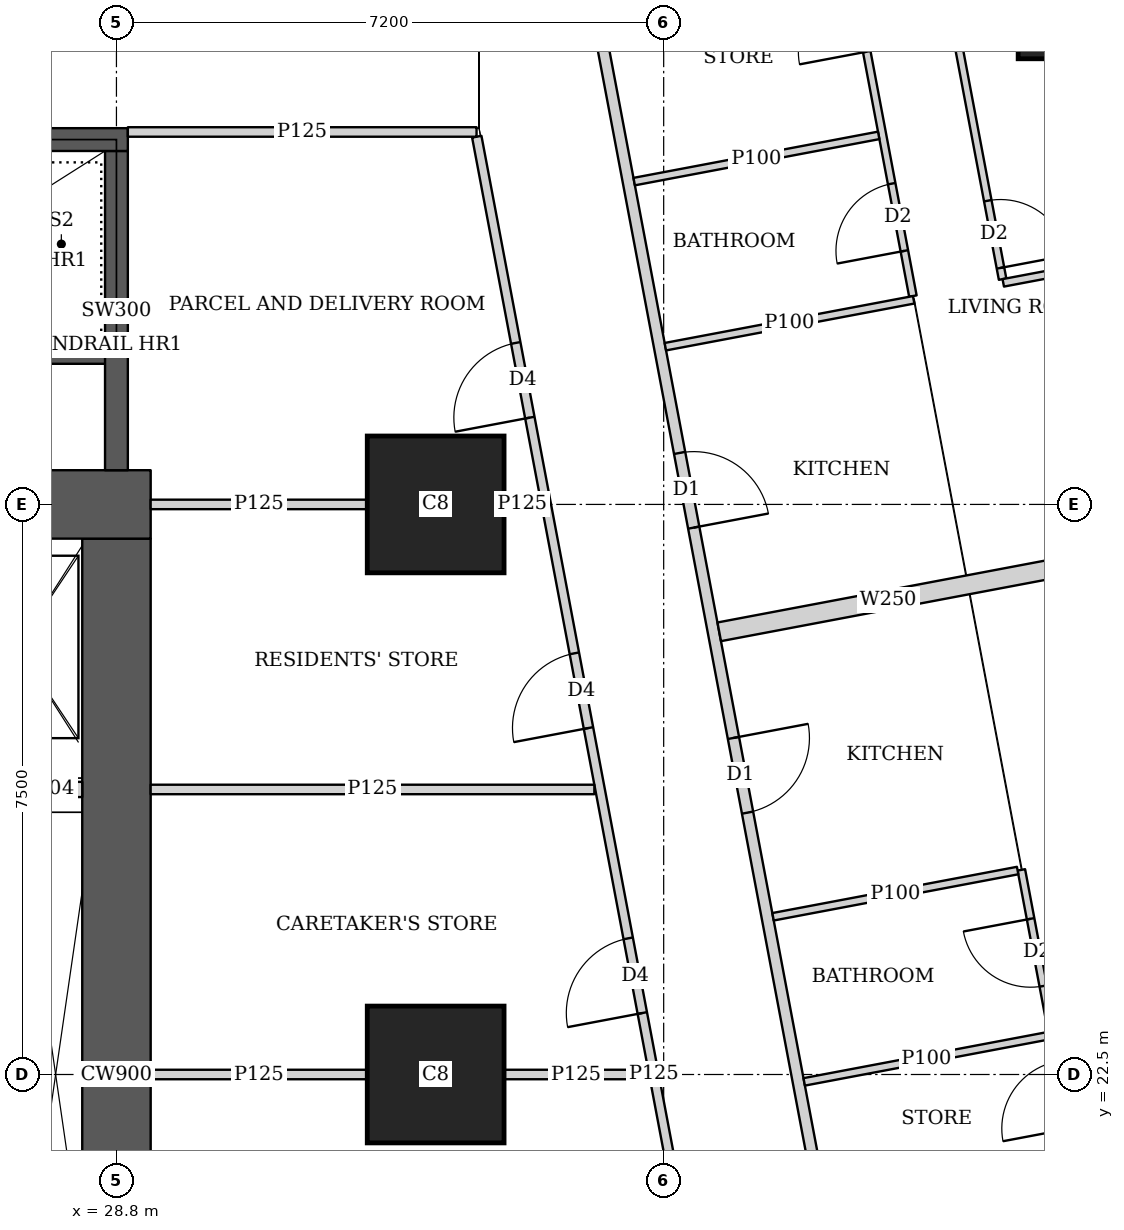
"""IFC4 building model, lengths in metres.
Left out: names, types, materials, properties, quantities, classifications, styles, units other than length and angle.
Written with IfcOpenShell. Run it as: python <this file> out.ifc"""

import sys

from ifc_helpers import new_model, si_unit, direction, frame, frame_2d, origin, origin_2d, place, context, subcontext, project, spatial, rectangle, extrude, element, fill, save


model = new_model("IFC4")
c1 = context("Model", 3, precision=1e-05, world=origin(), true_north=direction((0.0, 1.0)))
c2 = subcontext(c1, "Body", "Model", "MODEL_VIEW")
j1 = project(units=[si_unit("LENGTHUNIT", "METRE"), si_unit("PLANEANGLEUNIT", "RADIAN")], contexts=[c1])
p1 = place(None, origin())
s1 = spatial("IfcSite", under=j1, at=p1, CompositionType="ELEMENT")
p2 = place(p1, origin())
s2 = spatial("IfcBuilding", under=s1, at=p2, CompositionType="ELEMENT")
p3 = place(p2, frame((0.0, 0.0, 31.25)))
s3 = spatial("IfcBuildingStorey", under=s2, at=p3, CompositionType="ELEMENT", Elevation=31.25)
for number, where, z_axis, x_axis in (
    (1, (33.0, 22.5, 0.0), (0.0, 0.0, 1.0), (1.0, 0.0, 0.0)),
    (2, (33.0, 30.0, 0.0), (0.0, 0.0, 1.0), (1.0, 0.0, 0.0)),
):
    element("IfcColumn", number, at=place(p3, frame(where, z_axis=z_axis, x_axis=x_axis)), inside=s3, PredefinedType="COLUMN", context=c2, shape_type="SweptSolid", body=[
        extrude(rectangle(XDim=1.8, YDim=1.8, at=origin_2d()), origin(), (0.0, 0.0, 1.0), 3.75),
    ])
p4 = place(p3, frame((42.064, 37.263, 0.0), z_axis=(0.0, 0.0, 1.0), x_axis=(1.0, 0.0, 0.0)))
e3 = element("IfcColumn", 3, at=p4, inside=s3, PredefinedType="COLUMN", context=c2, shape_type="SweptSolid", body=[
    extrude(rectangle(XDim=2.8, YDim=2.8, at=origin_2d()), origin(), (0.0, 0.0, 1.0), 3.75),
])
p5 = place(p3, frame((13.95, 30.0, 0.0), z_axis=(0.0, 0.0, 1.0), x_axis=(1.0, 0.0, 0.0)))
e4 = element("IfcWall", 4, at=p5, inside=s3, PredefinedType="SHEAR", context=c2, shape_type="SweptSolid", body=[
    extrude(rectangle(XDim=15.3, YDim=0.9, at=frame_2d((7.65, 0.0))), origin(), (0.0, 0.0, 1.0), 3.75),
])
p6 = place(p5, frame((4.45, 0.0, 0.0)))
e5 = element("IfcOpeningElement", 5, at=p6, cuts=e4, PredefinedType="OPENING", context=c2, shape_type="SweptSolid", body=[
    extrude(rectangle(XDim=1.8, YDim=2.1, at=frame_2d((0.9, 1.05))), frame((0.0, 0.46, 0.0), z_axis=(0.0, -1.0, 0.0), x_axis=(1.0, 0.0, 0.0)), (0.0, 0.0, 1.0), 0.92),
])
p7 = place(p5, frame((10.7, 0.0, 0.0)))
e6 = element("IfcOpeningElement", 6, at=p7, cuts=e4, PredefinedType="OPENING", context=c2, shape_type="SweptSolid", body=[
    extrude(rectangle(XDim=1.1, YDim=2.1, at=frame_2d((0.55, 1.05))), frame((0.0, 0.46, 0.0), z_axis=(0.0, -1.0, 0.0), x_axis=(1.0, 0.0, 0.0)), (0.0, 0.0, 1.0), 0.92),
])
p8 = place(p3, frame((28.8, 15.45, 0.0), z_axis=(0.0, 0.0, 1.0), x_axis=(0.0, 1.0, 0.0)))
e7 = element("IfcWall", 7, at=p8, inside=s3, PredefinedType="SHEAR", context=c2, shape_type="SweptSolid", body=[
    extrude(rectangle(XDim=14.1, YDim=0.9, at=frame_2d((7.05, 0.0))), origin(), (0.0, 0.0, 1.0), 3.75),
])
p9 = place(p3, frame((21.45, 34.8, 0.0), z_axis=(0.0, 0.0, 1.0), x_axis=(1.0, 0.0, 0.0)))
e8 = element("IfcWall", 8, at=p9, inside=s3, PredefinedType="SHEAR", context=c2, shape_type="SweptSolid", body=[
    extrude(rectangle(XDim=7.5, YDim=0.3, at=frame_2d((3.75, 0.0))), origin(), (0.0, 0.0, 1.0), 3.75),
])
p10 = place(p9, frame((0.5, 0.0, 0.0)))
e9 = element("IfcOpeningElement", 9, at=p10, cuts=e8, PredefinedType="OPENING", context=c2, shape_type="SweptSolid", body=[
    extrude(rectangle(XDim=1.1, YDim=2.1, at=frame_2d((0.55, 1.05))), frame((0.0, 0.16, 0.0), z_axis=(0.0, -1.0, 0.0), x_axis=(1.0, 0.0, 0.0)), (0.0, 0.0, 1.0), 0.32),
])
p11 = place(p3, frame((28.8, 30.45, 0.0), z_axis=(0.0, 0.0, 1.0), x_axis=(0.0, 1.0, 0.0)))
e10 = element("IfcWall", 10, at=p11, inside=s3, PredefinedType="SHEAR", context=c2, shape_type="SweptSolid", body=[
    extrude(rectangle(XDim=4.2, YDim=0.3, at=frame_2d((2.1, 0.0))), origin(), (0.0, 0.0, 1.0), 3.75),
])
p12 = place(p3, frame((35.094, 36.585, 0.0), z_axis=(0.0, 0.0, 1.0), x_axis=(0.185588860311, -0.982627485331, 0.0)))
e11 = element("IfcWall", 11, at=p12, inside=s3, PredefinedType="SOLIDWALL", context=c2, shape_type="SweptSolid", body=[
    extrude(rectangle(XDim=34.797, YDim=0.15, at=frame_2d((17.399, 0.0))), origin(), (0.0, 0.0, 1.0), 2.5),
])
p13 = place(p12, frame((6.012, 0.0, 0.0)))
e12 = element("IfcOpeningElement", 12, at=p13, cuts=e11, PredefinedType="OPENING", context=c2, shape_type="SweptSolid", body=[
    extrude(rectangle(XDim=1.0, YDim=2.1, at=frame_2d((0.5, 1.05))), frame((0.0, 0.085, 0.0), z_axis=(0.0, -1.0, 0.0), x_axis=(1.0, 0.0, 0.0)), (0.0, 0.0, 1.0), 0.17),
])
p14 = place(p12, frame((9.828, 0.0, 0.0)))
e13 = element("IfcOpeningElement", 13, at=p14, cuts=e11, PredefinedType="OPENING", context=c2, shape_type="SweptSolid", body=[
    extrude(rectangle(XDim=1.0, YDim=2.1, at=frame_2d((0.5, 1.05))), frame((0.0, 0.085, 0.0), z_axis=(0.0, -1.0, 0.0), x_axis=(1.0, 0.0, 0.0)), (0.0, 0.0, 1.0), 0.17),
])
p15 = place(p12, frame((25.9, 0.0, 0.0)))
e14 = element("IfcOpeningElement", 14, at=p15, cuts=e11, PredefinedType="OPENING", context=c2, shape_type="SweptSolid", body=[
    extrude(rectangle(XDim=1.0, YDim=2.1, at=frame_2d((0.5, 1.05))), frame((0.0, 0.085, 0.0), z_axis=(0.0, -1.0, 0.0), x_axis=(1.0, 0.0, 0.0)), (0.0, 0.0, 1.0), 0.17),
])
p16 = place(p3, frame((38.9, 41.22, 0.0), z_axis=(0.0, 0.0, 1.0), x_axis=(0.18556562412, -0.982631873666, 0.0)))
e15 = element("IfcWall", 15, at=p16, inside=s3, PredefinedType="PARTITIONING", context=c2, shape_type="SweptSolid", body=[
    extrude(rectangle(XDim=8.402, YDim=0.1, at=frame_2d((4.201, 0.0))), origin(), (0.0, 0.0, 1.0), 3.5),
])
p17 = place(p16, frame((7.352, 0.0, 0.0)))
e16 = element("IfcOpeningElement", 16, at=p17, cuts=e15, PredefinedType="OPENING", context=c2, shape_type="SweptSolid", body=[
    extrude(rectangle(XDim=0.9, YDim=2.1, at=frame_2d((0.45, 1.05))), frame((0.0, 0.06, 0.0), z_axis=(0.0, -1.0, 0.0), x_axis=(1.0, 0.0, 0.0)), (0.0, 0.0, 1.0), 0.12),
])
p18 = place(p16, frame((1.9, 0.0, 0.0)))
e17 = element("IfcOpeningElement", 17, at=p18, cuts=e15, PredefinedType="OPENING", context=c2, shape_type="SweptSolid", body=[
    extrude(rectangle(XDim=0.9, YDim=2.1, at=frame_2d((0.45, 1.05))), frame((0.0, 0.06, 0.0), z_axis=(0.0, -1.0, 0.0), x_axis=(1.0, 0.0, 0.0)), (0.0, 0.0, 1.0), 0.12),
])
p19 = place(p3, frame((37.514, 42.089, 0.0), z_axis=(0.0, 0.0, 1.0), x_axis=(0.185543450498, -0.982636060796, 0.0)))
e18 = element("IfcWall", 18, at=p19, inside=s3, PredefinedType="PARTITIONING", context=c2, shape_type="SweptSolid", body=[
    extrude(rectangle(XDim=9.513, YDim=0.1, at=frame_2d((4.757, 0.0))), origin(), (0.0, 0.0, 1.0), 3.5),
])
p20 = place(p19, frame((8.008, 0.0, 0.0)))
e19 = element("IfcOpeningElement", 19, at=p20, cuts=e18, PredefinedType="OPENING", context=c2, shape_type="SweptSolid", body=[
    extrude(rectangle(XDim=0.9, YDim=2.1, at=frame_2d((0.45, 1.05))), frame((0.0, 0.06, 0.0), z_axis=(0.0, -1.0, 0.0), x_axis=(1.0, 0.0, 0.0)), (0.0, 0.0, 1.0), 0.12),
])
p21 = place(p19, frame((2.63, 0.0, 0.0)))
e20 = element("IfcOpeningElement", 20, at=p21, cuts=e18, PredefinedType="OPENING", context=c2, shape_type="SweptSolid", body=[
    extrude(rectangle(XDim=0.9, YDim=2.1, at=frame_2d((0.45, 1.05))), frame((0.0, 0.06, 0.0), z_axis=(0.0, -1.0, 0.0), x_axis=(1.0, 0.0, 0.0)), (0.0, 0.0, 1.0), 0.12),
])
p22 = place(p19, frame((5.341, 0.0, 0.0)))
e21 = element("IfcOpeningElement", 21, at=p22, cuts=e18, PredefinedType="OPENING", context=c2, shape_type="SweptSolid", body=[
    extrude(rectangle(XDim=0.9, YDim=2.1, at=frame_2d((0.45, 1.05))), frame((0.0, 0.06, 0.0), z_axis=(0.0, -1.0, 0.0), x_axis=(1.0, 0.0, 0.0)), (0.0, 0.0, 1.0), 0.12),
])
p23 = place(p3, frame((44.693, 33.713, 0.0), z_axis=(0.0, 0.0, 1.0), x_axis=(-0.982633535512, -0.185556823879, 0.0)))
e22 = element("IfcWall", 22, at=p23, inside=s3, PredefinedType="PARTITIONING", context=c2, shape_type="SweptSolid", body=[
    extrude(rectangle(XDim=4.3, YDim=0.1, at=frame_2d((2.15, 0.0))), origin(), (0.0, 0.0, 1.0), 2.05),
])
p24 = place(p3, frame((39.289, 32.692, 0.0), z_axis=(0.0, 0.0, 1.0), x_axis=(-0.982633623707, -0.185556356831, 0.0)))
e23 = element("IfcWall", 23, at=p24, inside=s3, PredefinedType="PARTITIONING", context=c2, shape_type="SweptSolid", body=[
    extrude(rectangle(XDim=3.325, YDim=0.1, at=frame_2d((1.663, 0.0))), origin(), (0.0, 0.0, 1.0), 3.5),
])
p25 = place(p3, frame((38.829, 34.855, 0.0), z_axis=(0.0, 0.0, 1.0), x_axis=(-0.982610347627, -0.185679575441, 0.0)))
e24 = element("IfcWall", 24, at=p25, inside=s3, PredefinedType="PARTITIONING", context=c2, shape_type="SweptSolid", body=[
    extrude(rectangle(XDim=3.274, YDim=0.1, at=frame_2d((1.637, 0.0))), origin(), (0.0, 0.0, 1.0), 3.5),
])
p26 = place(p3, frame((40.706, 25.192, 0.0), z_axis=(0.0, 0.0, 1.0), x_axis=(0.185572668944, -0.982630543257, 0.0)))
e25 = element("IfcWall", 25, at=p26, inside=s3, PredefinedType="PARTITIONING", context=c2, shape_type="SweptSolid", body=[
    extrude(rectangle(XDim=9.446, YDim=0.1, at=frame_2d((4.723, 0.0))), origin(), (0.0, 0.0, 1.0), 2.5),
])
p27 = place(p26, frame((0.655, 0.0, 0.0)))
e26 = element("IfcOpeningElement", 26, at=p27, cuts=e25, PredefinedType="OPENING", context=c2, shape_type="SweptSolid", body=[
    extrude(rectangle(XDim=0.9, YDim=2.1, at=frame_2d((0.45, 1.05))), frame((0.0, 0.06, 0.0), z_axis=(0.0, -1.0, 0.0), x_axis=(1.0, 0.0, 0.0)), (0.0, 0.0, 1.0), 0.12),
])
p28 = place(p26, frame((4.166, 0.0, 0.0)))
e27 = element("IfcOpeningElement", 27, at=p28, cuts=e25, PredefinedType="OPENING", context=c2, shape_type="SweptSolid", body=[
    extrude(rectangle(XDim=0.9, YDim=2.1, at=frame_2d((0.45, 1.05))), frame((0.0, 0.06, 0.0), z_axis=(0.0, -1.0, 0.0), x_axis=(1.0, 0.0, 0.0)), (0.0, 0.0, 1.0), 0.12),
])
p29 = place(p26, frame((8.396, 0.0, 0.0)))
e28 = element("IfcOpeningElement", 28, at=p29, cuts=e25, PredefinedType="OPENING", context=c2, shape_type="SweptSolid", body=[
    extrude(rectangle(XDim=0.9, YDim=2.1, at=frame_2d((0.45, 1.05))), frame((0.0, 0.06, 0.0), z_axis=(0.0, -1.0, 0.0), x_axis=(1.0, 0.0, 0.0)), (0.0, 0.0, 1.0), 0.12),
])
p30 = place(p26, frame((2.563, 0.0, 0.0)))
e29 = element("IfcOpeningElement", 29, at=p30, cuts=e25, PredefinedType="OPENING", context=c2, shape_type="SweptSolid", body=[
    extrude(rectangle(XDim=0.9, YDim=2.1, at=frame_2d((0.45, 1.05))), frame((0.0, 0.06, 0.0), z_axis=(0.0, -1.0, 0.0), x_axis=(1.0, 0.0, 0.0)), (0.0, 0.0, 1.0), 0.12),
])
p31 = place(p26, frame((6.074, 0.0, 0.0)))
e30 = element("IfcOpeningElement", 30, at=p31, cuts=e25, PredefinedType="OPENING", context=c2, shape_type="SweptSolid", body=[
    extrude(rectangle(XDim=0.9, YDim=2.1, at=frame_2d((0.45, 1.05))), frame((0.0, 0.06, 0.0), z_axis=(0.0, -1.0, 0.0), x_axis=(1.0, 0.0, 0.0)), (0.0, 0.0, 1.0), 0.12),
])
p32 = place(p3, frame((40.657, 25.183, 0.0), z_axis=(0.0, 0.0, 1.0), x_axis=(-0.982607026909, -0.185697147715, 0.0)))
e31 = element("IfcWall", 31, at=p32, inside=s3, PredefinedType="PARTITIONING", context=c2, shape_type="SweptSolid", body=[
    extrude(rectangle(XDim=3.275, YDim=0.1, at=frame_2d((1.637, 0.0))), origin(), (0.0, 0.0, 1.0), 3.5),
])
p33 = place(p3, frame((41.067, 23.011, 0.0), z_axis=(0.0, 0.0, 1.0), x_axis=(-0.982618057925, -0.185638768151, 0.0)))
e32 = element("IfcWall", 32, at=p33, inside=s3, PredefinedType="PARTITIONING", context=c2, shape_type="SweptSolid", body=[
    extrude(rectangle(XDim=3.275, YDim=0.1, at=frame_2d((1.637, 0.0))), origin(), (0.0, 0.0, 1.0), 2.5),
])
p34 = place(p3, frame((41.177, 29.164, 0.0), z_axis=(0.0, 0.0, 1.0), x_axis=(-0.982612837616, -0.185666398014, 0.0)))
e33 = element("IfcWall", 33, at=p34, inside=s3, PredefinedType="SOLIDWALL", context=c2, shape_type="SweptSolid", body=[
    extrude(rectangle(XDim=4.525, YDim=0.25, at=frame_2d((2.262, 0.0))), origin(), (0.0, 0.0, 1.0), 2.5),
])
p35 = place(p3, frame((28.95, 34.9, 0.0), z_axis=(0.0, 0.0, 1.0), x_axis=(1.0, 0.0, 0.0)))
e34 = element("IfcWall", 34, at=p35, inside=s3, PredefinedType="PARTITIONING", context=c2, shape_type="SweptSolid", body=[
    extrude(rectangle(XDim=4.588, YDim=0.125, at=frame_2d((2.294, 0.0))), origin(), (0.0, 0.0, 1.0), 3.5),
])
p36 = place(p3, frame((38.202, 10.163, 0.0), z_axis=(0.0, 0.0, 1.0), x_axis=(-0.185610321132, 0.982623431783, 0.0)))
e35 = element("IfcWall", 35, at=p36, inside=s3, PredefinedType="PARTITIONING", context=c2, shape_type="SweptSolid", body=[
    extrude(rectangle(XDim=25.111, YDim=0.125, at=frame_2d((12.556, 0.0))), origin(), (0.0, 0.0, 1.0), 2.5),
])
p37 = place(p36, frame((0.708, 0.0, 0.0)))
e36 = element("IfcOpeningElement", 36, at=p37, cuts=e35, PredefinedType="OPENING", context=c2, shape_type="SweptSolid", body=[
    extrude(rectangle(XDim=1.0, YDim=2.1, at=frame_2d((0.5, 1.05))), frame((0.0, 0.073, 0.0), z_axis=(0.0, -1.0, 0.0), x_axis=(1.0, 0.0, 0.0)), (0.0, 0.0, 1.0), 0.145),
])
p38 = place(p36, frame((6.1, 0.0, 0.0)))
e37 = element("IfcOpeningElement", 37, at=p38, cuts=e35, PredefinedType="OPENING", context=c2, shape_type="SweptSolid", body=[
    extrude(rectangle(XDim=1.0, YDim=2.1, at=frame_2d((0.5, 1.05))), frame((0.0, 0.073, 0.0), z_axis=(0.0, -1.0, 0.0), x_axis=(1.0, 0.0, 0.0)), (0.0, 0.0, 1.0), 0.145),
])
p39 = place(p36, frame((13.378, 0.0, 0.0)))
e38 = element("IfcOpeningElement", 38, at=p39, cuts=e35, PredefinedType="OPENING", context=c2, shape_type="SweptSolid", body=[
    extrude(rectangle(XDim=1.0, YDim=2.1, at=frame_2d((0.5, 1.05))), frame((0.0, 0.073, 0.0), z_axis=(0.0, -1.0, 0.0), x_axis=(1.0, 0.0, 0.0)), (0.0, 0.0, 1.0), 0.145),
])
p40 = place(p36, frame((17.194, 0.0, 0.0)))
e39 = element("IfcOpeningElement", 39, at=p40, cuts=e35, PredefinedType="OPENING", context=c2, shape_type="SweptSolid", body=[
    extrude(rectangle(XDim=1.0, YDim=2.1, at=frame_2d((0.5, 1.05))), frame((0.0, 0.073, 0.0), z_axis=(0.0, -1.0, 0.0), x_axis=(1.0, 0.0, 0.0)), (0.0, 0.0, 1.0), 0.145),
])
p41 = place(p36, frame((21.35, 0.0, 0.0)))
e40 = element("IfcOpeningElement", 40, at=p41, cuts=e35, PredefinedType="OPENING", context=c2, shape_type="SweptSolid", body=[
    extrude(rectangle(XDim=1.0, YDim=2.1, at=frame_2d((0.5, 1.05))), frame((0.0, 0.073, 0.0), z_axis=(0.0, -1.0, 0.0), x_axis=(1.0, 0.0, 0.0)), (0.0, 0.0, 1.0), 0.145),
])
p42 = place(p3, frame((29.25, 22.5, 0.0), z_axis=(0.0, 0.0, 1.0), x_axis=(1.0, 0.0, 0.0)))
e41 = element("IfcWall", 41, at=p42, inside=s3, PredefinedType="PARTITIONING", context=c2, shape_type="SweptSolid", body=[
    extrude(rectangle(XDim=2.849, YDim=0.125, at=frame_2d((1.425, 0.0))), origin(), (0.0, 0.0, 1.0), 3.5),
])
p43 = place(p3, frame((33.901, 22.5, 0.0), z_axis=(0.0, 0.0, 1.0), x_axis=(1.0, 0.0, 0.0)))
e42 = element("IfcWall", 42, at=p43, inside=s3, PredefinedType="PARTITIONING", context=c2, shape_type="SweptSolid", body=[
    extrude(rectangle(XDim=1.895, YDim=0.125, at=frame_2d((0.948, 0.0))), origin(), (0.0, 0.0, 1.0), 2.5),
])
p44 = place(p3, frame((29.25, 26.25, 0.0), z_axis=(0.0, 0.0, 1.0), x_axis=(1.0, 0.0, 0.0)))
e43 = element("IfcWall", 43, at=p44, inside=s3, PredefinedType="PARTITIONING", context=c2, shape_type="SweptSolid", body=[
    extrude(rectangle(XDim=5.838, YDim=0.125, at=frame_2d((2.919, 0.0))), origin(), (0.0, 0.0, 1.0), 3.5),
])
p45 = place(p3, frame((29.25, 30.0, 0.0), z_axis=(0.0, 0.0, 1.0), x_axis=(1.0, 0.0, 0.0)))
e44 = element("IfcWall", 44, at=p45, inside=s3, PredefinedType="PARTITIONING", context=c2, shape_type="SweptSolid", body=[
    extrude(rectangle(XDim=2.849, YDim=0.125, at=frame_2d((1.425, 0.0))), origin(), (0.0, 0.0, 1.0), 3.5),
])
p46 = place(p3, frame((33.901, 30.0, 0.0), z_axis=(0.0, 0.0, 1.0), x_axis=(1.0, 0.0, 0.0)))
e45 = element("IfcWall", 45, at=p46, inside=s3, PredefinedType="PARTITIONING", context=c2, shape_type="SweptSolid", body=[
    extrude(rectangle(XDim=0.478, YDim=0.125, at=frame_2d((0.239, 0.0))), origin(), (0.0, 0.0, 1.0), 2.5),
])
p47 = place(p3, frame((23.0, 31.95, 0.0), z_axis=(0.0, 0.0, 1.0), x_axis=(1.0, 0.0, 0.0)))
e46 = element("IfcWall", 46, at=p47, inside=s3, PredefinedType="SHEAR", context=c2, shape_type="SweptSolid", body=[
    extrude(rectangle(XDim=5.8, YDim=0.2, at=frame_2d((2.9, 0.0))), origin(), (0.0, 0.0, 1.0), 3.75),
])
p48 = place(p3, frame((27.4, 26.25, 0.0), z_axis=(0.0, 0.0, 1.0), x_axis=(1.0, 0.0, 0.0)))
e47 = element("IfcWall", 47, at=p48, inside=s3, PredefinedType="SOLIDWALL", context=c2, shape_type="SweptSolid", body=[
    extrude(rectangle(XDim=0.95, YDim=0.2, at=frame_2d((0.475, 0.0))), origin(), (0.0, 0.0, 1.0), 3.5),
])
p49 = place(p17, origin())
e48 = element("IfcDoor", 48, at=p49, inside=s3, OperationType="SINGLE_SWING_RIGHT", PredefinedType="DOOR", context=c2, shape_type="SweptSolid", body=[
    extrude(rectangle(XDim=0.9, YDim=2.1, at=frame_2d((0.45, 1.05))), frame((0.0, 0.025, 0.0), z_axis=(0.0, -1.0, 0.0), x_axis=(1.0, 0.0, 0.0)), (0.0, 0.0, 1.0), 0.05),
])
fill(e16, e48)
p50 = place(p20, origin())
e49 = element("IfcDoor", 49, at=p50, inside=s3, OperationType="SINGLE_SWING_LEFT", PredefinedType="DOOR", context=c2, shape_type="SweptSolid", body=[
    extrude(rectangle(XDim=0.9, YDim=2.1, at=frame_2d((0.45, 1.05))), frame((0.0, 0.025, 0.0), z_axis=(0.0, -1.0, 0.0), x_axis=(1.0, 0.0, 0.0)), (0.0, 0.0, 1.0), 0.05),
])
fill(e19, e49)
p51 = place(p13, origin())
e50 = element("IfcDoor", 50, at=p51, inside=s3, OperationType="SINGLE_SWING_RIGHT", PredefinedType="DOOR", context=c2, shape_type="SweptSolid", body=[
    extrude(rectangle(XDim=1.0, YDim=2.1, at=frame_2d((0.5, 1.05))), frame((0.0, 0.025, 0.0), z_axis=(0.0, -1.0, 0.0), x_axis=(1.0, 0.0, 0.0)), (0.0, 0.0, 1.0), 0.05),
])
fill(e12, e50)
p52 = place(p27, origin())
e51 = element("IfcDoor", 51, at=p52, inside=s3, OperationType="SINGLE_SWING_RIGHT", PredefinedType="DOOR", context=c2, shape_type="SweptSolid", body=[
    extrude(rectangle(XDim=0.9, YDim=2.1, at=frame_2d((0.45, 1.05))), frame((0.0, 0.025, 0.0), z_axis=(0.0, -1.0, 0.0), x_axis=(1.0, 0.0, 0.0)), (0.0, 0.0, 1.0), 0.05),
])
fill(e26, e51)
p53 = place(p14, origin())
e52 = element("IfcDoor", 52, at=p53, inside=s3, OperationType="SINGLE_SWING_LEFT", PredefinedType="DOOR", context=c2, shape_type="SweptSolid", body=[
    extrude(rectangle(XDim=1.0, YDim=2.1, at=frame_2d((0.5, 1.05))), frame((0.0, 0.025, 0.0), z_axis=(0.0, -1.0, 0.0), x_axis=(1.0, 0.0, 0.0)), (0.0, 0.0, 1.0), 0.05),
])
fill(e13, e52)
p54 = place(p39, origin())
e53 = element("IfcDoor", 53, at=p54, inside=s3, OperationType="SINGLE_SWING_LEFT", PredefinedType="DOOR", context=c2, shape_type="SweptSolid", body=[
    extrude(rectangle(XDim=1.0, YDim=2.1, at=frame_2d((0.5, 1.05))), frame((0.0, 0.025, 0.0), z_axis=(0.0, -1.0, 0.0), x_axis=(1.0, 0.0, 0.0)), (0.0, 0.0, 1.0), 0.05),
])
fill(e38, e53)
p55 = place(p40, origin())
e54 = element("IfcDoor", 54, at=p55, inside=s3, OperationType="SINGLE_SWING_LEFT", PredefinedType="DOOR", context=c2, shape_type="SweptSolid", body=[
    extrude(rectangle(XDim=1.0, YDim=2.1, at=frame_2d((0.5, 1.05))), frame((0.0, 0.025, 0.0), z_axis=(0.0, -1.0, 0.0), x_axis=(1.0, 0.0, 0.0)), (0.0, 0.0, 1.0), 0.05),
])
fill(e39, e54)
p56 = place(p41, origin())
e55 = element("IfcDoor", 55, at=p56, inside=s3, OperationType="SINGLE_SWING_LEFT", PredefinedType="DOOR", context=c2, shape_type="SweptSolid", body=[
    extrude(rectangle(XDim=1.0, YDim=2.1, at=frame_2d((0.5, 1.05))), frame((0.0, 0.025, 0.0), z_axis=(0.0, -1.0, 0.0), x_axis=(1.0, 0.0, 0.0)), (0.0, 0.0, 1.0), 0.05),
])
fill(e40, e55)
save(model, sys.argv[1])
